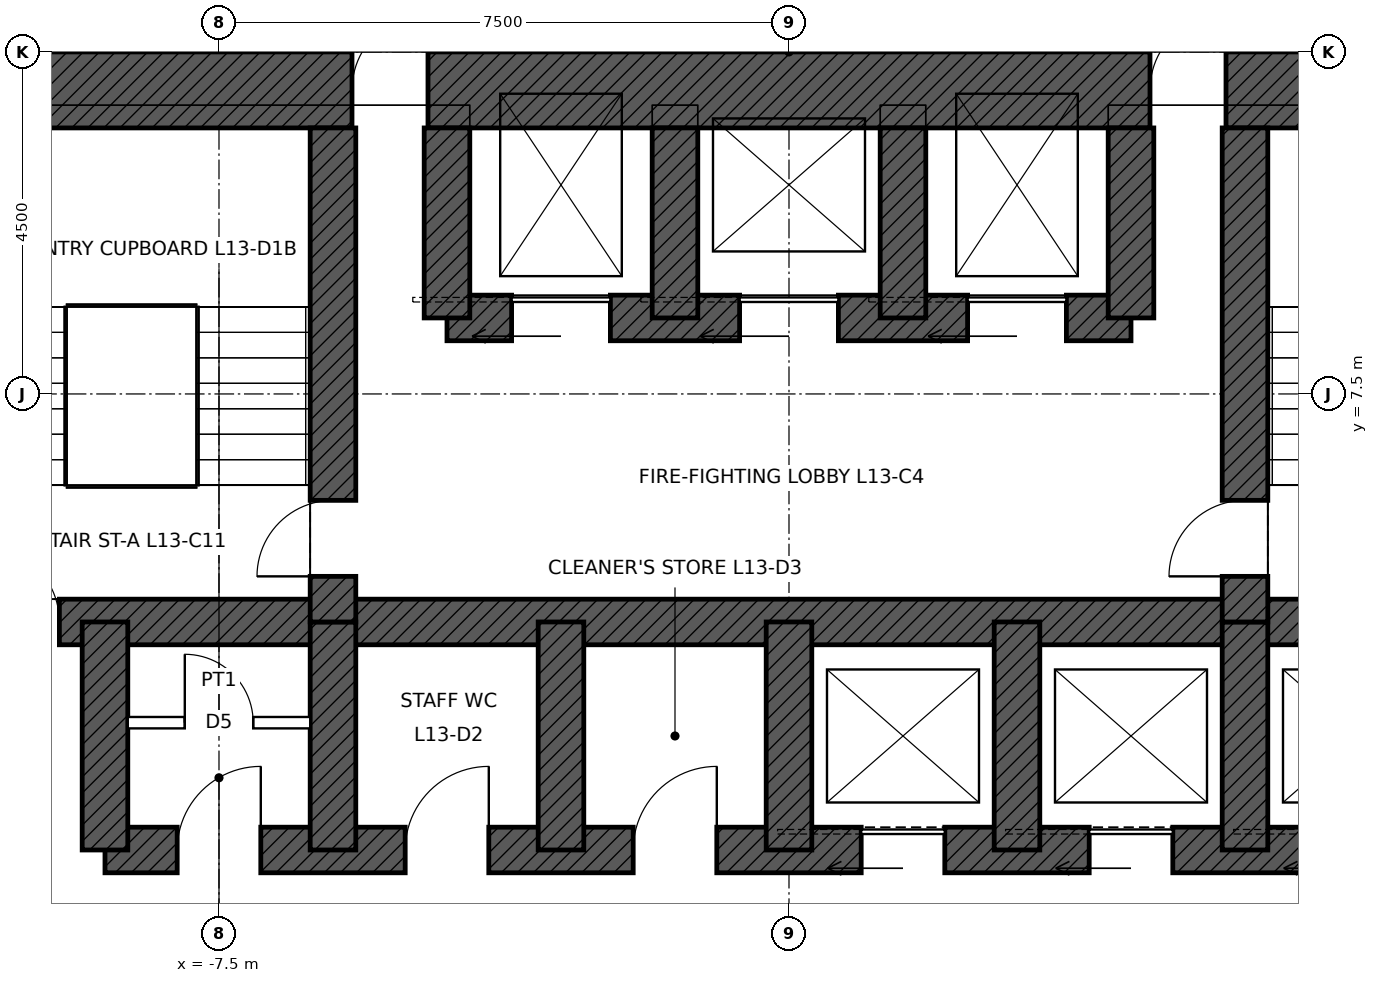
"""IFC4 building model, lengths in metres.
Left out: names, types, materials, properties, quantities, classifications, styles, units other than length and angle.
Written with IfcOpenShell. Run it as: python <this file> out.ifc"""

import sys

from ifc_helpers import new_model, si_unit, direction, frame, frame_2d, origin, place, context, subcontext, project, spatial, rectangle, extrude, element, fill, save


model = new_model("IFC4")
c1 = context("Model", 3, precision=1e-05, world=origin(), true_north=direction((0.0, 1.0)))
c2 = subcontext(c1, "Body", "Model", "MODEL_VIEW")
j1 = project(units=[si_unit("LENGTHUNIT", "METRE"), si_unit("PLANEANGLEUNIT", "RADIAN")], contexts=[c1])
p1 = place(None, origin())
s1 = spatial("IfcSite", under=j1, at=p1, CompositionType="ELEMENT")
p2 = place(p1, origin())
s2 = spatial("IfcBuilding", under=s1, at=p2, CompositionType="ELEMENT")
p3 = place(p2, frame((0.0, 0.0, 68.4)))
s3 = spatial("IfcBuildingStorey", under=s2, at=p3, CompositionType="ELEMENT", Elevation=68.4)
p4 = place(p3, frame((-12.0, 11.5, 0.0), z_axis=(0.0, 0.0, 1.0), x_axis=(1.0, 0.0, 0.0)))
e1 = element("IfcWall", 1, at=p4, inside=s3, PredefinedType="SHEAR", context=c2, shape_type="SweptSolid", body=[
    extrude(rectangle(XDim=24.0, YDim=1.0, at=frame_2d((12.0, 0.0))), origin(), (0.0, 0.0, 1.0), 5.0),
])
p5 = place(p4, frame((6.25, 0.0, 0.0)))
e2 = element("IfcOpeningElement", 2, at=p5, cuts=e1, PredefinedType="OPENING", context=c2, shape_type="SweptSolid", body=[
    extrude(rectangle(XDim=1.0, YDim=2.4, at=frame_2d((0.5, 1.2))), frame((0.0, 0.51, 0.0), z_axis=(0.0, -1.0, 0.0), x_axis=(1.0, 0.0, 0.0)), (0.0, 0.0, 1.0), 1.02),
])
p6 = place(p4, frame((16.75, 0.0, 0.0)))
e3 = element("IfcOpeningElement", 3, at=p6, cuts=e1, PredefinedType="OPENING", context=c2, shape_type="SweptSolid", body=[
    extrude(rectangle(XDim=1.0, YDim=2.4, at=frame_2d((0.5, 1.2))), frame((0.0, 0.51, 0.0), z_axis=(0.0, -1.0, 0.0), x_axis=(1.0, 0.0, 0.0)), (0.0, 0.0, 1.0), 1.02),
])
p7 = place(p3, frame((-11.0, 4.5, 0.0), z_axis=(0.0, 0.0, 1.0), x_axis=(1.0, 0.0, 0.0)))
e4 = element("IfcWall", 4, at=p7, inside=s3, PredefinedType="SHEAR", context=c2, shape_type="SweptSolid", body=[
    extrude(rectangle(XDim=22.0, YDim=0.6, at=frame_2d((11.0, 0.0))), origin(), (0.0, 0.0, 1.0), 5.0),
])
p8 = place(p7, frame((0.4, 0.0, 0.0)))
e5 = element("IfcOpeningElement", 5, at=p8, cuts=e4, PredefinedType="OPENING", context=c2, shape_type="SweptSolid", body=[
    extrude(rectangle(XDim=1.0, YDim=2.1, at=frame_2d((0.5, 1.05))), frame((0.0, 0.31, 0.0), z_axis=(0.0, -1.0, 0.0), x_axis=(1.0, 0.0, 0.0)), (0.0, 0.0, 1.0), 0.62),
])
p9 = place(p7, frame((20.6, 0.0, 0.0)))
e6 = element("IfcOpeningElement", 6, at=p9, cuts=e4, PredefinedType="OPENING", context=c2, shape_type="SweptSolid", body=[
    extrude(rectangle(XDim=1.0, YDim=2.1, at=frame_2d((0.5, 1.05))), frame((0.0, 0.31, 0.0), z_axis=(0.0, -1.0, 0.0), x_axis=(1.0, 0.0, 0.0)), (0.0, 0.0, 1.0), 0.62),
])
p10 = place(p3, frame((-9.0, 1.5, 0.0), z_axis=(0.0, 0.0, 1.0), x_axis=(1.0, 0.0, 0.0)))
e7 = element("IfcWall", 7, at=p10, inside=s3, PredefinedType="SHEAR", context=c2, shape_type="SweptSolid", body=[
    extrude(rectangle(XDim=18.0, YDim=0.6, at=frame_2d((9.0, 0.0))), origin(), (0.0, 0.0, 1.0), 5.0),
])
p11 = place(p10, frame((9.95, 0.0, 0.0)))
e8 = element("IfcOpeningElement", 8, at=p11, cuts=e7, PredefinedType="OPENING", context=c2, shape_type="SweptSolid", body=[
    extrude(rectangle(XDim=1.1, YDim=2.1, at=frame_2d((0.55, 1.05))), frame((0.0, 0.31, 0.0), z_axis=(0.0, -1.0, 0.0), x_axis=(1.0, 0.0, 0.0)), (0.0, 0.0, 1.0), 0.62),
])
p12 = place(p10, frame((12.95, 0.0, 0.0)))
e9 = element("IfcOpeningElement", 9, at=p12, cuts=e7, PredefinedType="OPENING", context=c2, shape_type="SweptSolid", body=[
    extrude(rectangle(XDim=1.1, YDim=2.1, at=frame_2d((0.55, 1.05))), frame((0.0, 0.31, 0.0), z_axis=(0.0, -1.0, 0.0), x_axis=(1.0, 0.0, 0.0)), (0.0, 0.0, 1.0), 0.62),
])
p13 = place(p10, frame((15.95, 0.0, 0.0)))
e10 = element("IfcOpeningElement", 10, at=p13, cuts=e7, PredefinedType="OPENING", context=c2, shape_type="SweptSolid", body=[
    extrude(rectangle(XDim=1.1, YDim=2.1, at=frame_2d((0.55, 1.05))), frame((0.0, 0.31, 0.0), z_axis=(0.0, -1.0, 0.0), x_axis=(1.0, 0.0, 0.0)), (0.0, 0.0, 1.0), 0.62),
])
p14 = place(p10, frame((0.95, 0.0, 0.0)))
e11 = element("IfcOpeningElement", 11, at=p14, cuts=e7, PredefinedType="OPENING", context=c2, shape_type="SweptSolid", body=[
    extrude(rectangle(XDim=1.1, YDim=2.1, at=frame_2d((0.55, 1.05))), frame((0.0, 0.31, 0.0), z_axis=(0.0, -1.0, 0.0), x_axis=(1.0, 0.0, 0.0)), (0.0, 0.0, 1.0), 0.62),
])
p15 = place(p10, frame((3.95, 0.0, 0.0)))
e12 = element("IfcOpeningElement", 12, at=p15, cuts=e7, PredefinedType="OPENING", context=c2, shape_type="SweptSolid", body=[
    extrude(rectangle(XDim=1.1, YDim=2.1, at=frame_2d((0.55, 1.05))), frame((0.0, 0.31, 0.0), z_axis=(0.0, -1.0, 0.0), x_axis=(1.0, 0.0, 0.0)), (0.0, 0.0, 1.0), 0.62),
])
p16 = place(p10, frame((6.95, 0.0, 0.0)))
e13 = element("IfcOpeningElement", 13, at=p16, cuts=e7, PredefinedType="OPENING", context=c2, shape_type="SweptSolid", body=[
    extrude(rectangle(XDim=1.1, YDim=2.1, at=frame_2d((0.55, 1.05))), frame((0.0, 0.31, 0.0), z_axis=(0.0, -1.0, 0.0), x_axis=(1.0, 0.0, 0.0)), (0.0, 0.0, 1.0), 0.62),
])
p17 = place(p3, frame((-4.5, 8.5, 0.0), z_axis=(0.0, 0.0, 1.0), x_axis=(1.0, 0.0, 0.0)))
e14 = element("IfcWall", 14, at=p17, inside=s3, PredefinedType="SHEAR", context=c2, shape_type="SweptSolid", body=[
    extrude(rectangle(XDim=9.0, YDim=0.6, at=frame_2d((4.5, 0.0))), origin(), (0.0, 0.0, 1.0), 5.0),
])
p18 = place(p17, frame((0.85, 0.0, 0.0)))
e15 = element("IfcOpeningElement", 15, at=p18, cuts=e14, PredefinedType="OPENING", context=c2, shape_type="SweptSolid", body=[
    extrude(rectangle(XDim=1.3, YDim=2.4, at=frame_2d((0.65, 1.2))), frame((0.0, 0.31, 0.0), z_axis=(0.0, -1.0, 0.0), x_axis=(1.0, 0.0, 0.0)), (0.0, 0.0, 1.0), 0.62),
])
p19 = place(p17, frame((6.85, 0.0, 0.0)))
e16 = element("IfcOpeningElement", 16, at=p19, cuts=e14, PredefinedType="OPENING", context=c2, shape_type="SweptSolid", body=[
    extrude(rectangle(XDim=1.3, YDim=2.4, at=frame_2d((0.65, 1.2))), frame((0.0, 0.31, 0.0), z_axis=(0.0, -1.0, 0.0), x_axis=(1.0, 0.0, 0.0)), (0.0, 0.0, 1.0), 0.62),
])
p20 = place(p17, frame((3.85, 0.0, 0.0)))
e17 = element("IfcOpeningElement", 17, at=p20, cuts=e14, PredefinedType="OPENING", context=c2, shape_type="SweptSolid", body=[
    extrude(rectangle(XDim=1.3, YDim=2.4, at=frame_2d((0.65, 1.2))), frame((0.0, 0.31, 0.0), z_axis=(0.0, -1.0, 0.0), x_axis=(1.0, 0.0, 0.0)), (0.0, 0.0, 1.0), 0.62),
])
for number, where, z_axis, x_axis in (
    (18, (-9.0, 1.5, 0.0), (0.0, 0.0, 1.0), (0.0, 1.0, 0.0)),
    (19, (-6.0, 1.5, 0.0), (0.0, 0.0, 1.0), (0.0, 1.0, 0.0)),
    (20, (-3.0, 1.5, 0.0), (0.0, 0.0, 1.0), (0.0, 1.0, 0.0)),
    (21, (0.0, 1.5, 0.0), (0.0, 0.0, 1.0), (0.0, 1.0, 0.0)),
    (22, (3.0, 1.5, 0.0), (0.0, 0.0, 1.0), (0.0, 1.0, 0.0)),
    (23, (6.0, 1.5, 0.0), (0.0, 0.0, 1.0), (0.0, 1.0, 0.0)),
):
    element("IfcWall", number, at=place(p3, frame(where, z_axis=z_axis, x_axis=x_axis)), inside=s3, PredefinedType="SHEAR", context=c2, shape_type="SweptSolid", body=[
        extrude(rectangle(XDim=3.0, YDim=0.6, at=frame_2d((1.5, 0.0))), origin(), (0.0, 0.0, 1.0), 5.0),
    ])
p21 = place(p3, frame((-6.0, 4.5, 0.0), z_axis=(0.0, 0.0, 1.0), x_axis=(0.0, 1.0, 0.0)))
e24 = element("IfcWall", 24, at=p21, inside=s3, PredefinedType="SHEAR", context=c2, shape_type="SweptSolid", body=[
    extrude(rectangle(XDim=6.5, YDim=0.6, at=frame_2d((3.25, 0.0))), origin(), (0.0, 0.0, 1.0), 5.0),
])
p22 = place(p21, frame((0.6, 0.0, 0.0)))
e25 = element("IfcOpeningElement", 25, at=p22, cuts=e24, PredefinedType="OPENING", context=c2, shape_type="SweptSolid", body=[
    extrude(rectangle(XDim=1.0, YDim=2.1, at=frame_2d((0.5, 1.05))), frame((0.0, 0.31, 0.0), z_axis=(0.0, -1.0, 0.0), x_axis=(1.0, 0.0, 0.0)), (0.0, 0.0, 1.0), 0.62),
])
p23 = place(p3, frame((6.0, 4.5, 0.0), z_axis=(0.0, 0.0, 1.0), x_axis=(0.0, 1.0, 0.0)))
e26 = element("IfcWall", 26, at=p23, inside=s3, PredefinedType="SHEAR", context=c2, shape_type="SweptSolid", body=[
    extrude(rectangle(XDim=6.5, YDim=0.6, at=frame_2d((3.25, 0.0))), origin(), (0.0, 0.0, 1.0), 5.0),
])
p24 = place(p23, frame((0.6, 0.0, 0.0)))
e27 = element("IfcOpeningElement", 27, at=p24, cuts=e26, PredefinedType="OPENING", context=c2, shape_type="SweptSolid", body=[
    extrude(rectangle(XDim=1.0, YDim=2.1, at=frame_2d((0.5, 1.05))), frame((0.0, 0.31, 0.0), z_axis=(0.0, -1.0, 0.0), x_axis=(1.0, 0.0, 0.0)), (0.0, 0.0, 1.0), 0.62),
])
for number, where, z_axis, x_axis in (
    (28, (-4.5, 8.5, 0.0), (0.0, 0.0, 1.0), (0.0, 1.0, 0.0)),
    (29, (4.5, 8.5, 0.0), (0.0, 0.0, 1.0), (0.0, 1.0, 0.0)),
    (30, (-1.5, 8.5, 0.0), (0.0, 0.0, 1.0), (0.0, 1.0, 0.0)),
    (31, (1.5, 8.5, 0.0), (0.0, 0.0, 1.0), (0.0, 1.0, 0.0)),
):
    element("IfcWall", number, at=place(p3, frame(where, z_axis=z_axis, x_axis=x_axis)), inside=s3, PredefinedType="SHEAR", context=c2, shape_type="SweptSolid", body=[
        extrude(rectangle(XDim=2.5, YDim=0.6, at=frame_2d((1.25, 0.0))), origin(), (0.0, 0.0, 1.0), 5.0),
    ])
p25 = place(p3, frame((-8.7, 3.175, 0.0), z_axis=(0.0, 0.0, 1.0), x_axis=(1.0, 0.0, 0.0)))
e32 = element("IfcWall", 32, at=p25, inside=s3, PredefinedType="PARTITIONING", context=c2, shape_type="SweptSolid", body=[
    extrude(rectangle(XDim=2.4, YDim=0.15, at=frame_2d((1.2, 0.0))), origin(), (0.0, 0.0, 1.0), 4.75),
])
p26 = place(p25, frame((0.75, 0.0, 0.0)))
e33 = element("IfcOpeningElement", 33, at=p26, cuts=e32, PredefinedType="OPENING", context=c2, shape_type="SweptSolid", body=[
    extrude(rectangle(XDim=0.9, YDim=2.1, at=frame_2d((0.45, 1.05))), frame((0.0, 0.085, 0.0), z_axis=(0.0, -1.0, 0.0), x_axis=(1.0, 0.0, 0.0)), (0.0, 0.0, 1.0), 0.17),
])
p27 = place(p8, origin())
e34 = element("IfcDoor", 34, at=p27, inside=s3, OperationType="SINGLE_SWING_LEFT", PredefinedType="DOOR", context=c2, shape_type="SweptSolid", body=[
    extrude(rectangle(XDim=1.0, YDim=2.1, at=frame_2d((0.5, 1.05))), frame((0.0, 0.025, 0.0), z_axis=(0.0, -1.0, 0.0), x_axis=(1.0, 0.0, 0.0)), (0.0, 0.0, 1.0), 0.05),
])
fill(e5, e34)
p28 = place(p22, origin())
e35 = element("IfcDoor", 35, at=p28, inside=s3, OperationType="SINGLE_SWING_LEFT", PredefinedType="DOOR", context=c2, shape_type="SweptSolid", body=[
    extrude(rectangle(XDim=1.0, YDim=2.1, at=frame_2d((0.5, 1.05))), frame((0.0, 0.025, 0.0), z_axis=(0.0, -1.0, 0.0), x_axis=(1.0, 0.0, 0.0)), (0.0, 0.0, 1.0), 0.05),
])
fill(e25, e35)
p29 = place(p24, origin())
e36 = element("IfcDoor", 36, at=p29, inside=s3, OperationType="SINGLE_SWING_LEFT", PredefinedType="DOOR", context=c2, shape_type="SweptSolid", body=[
    extrude(rectangle(XDim=1.0, YDim=2.1, at=frame_2d((0.5, 1.05))), frame((0.0, 0.025, 0.0), z_axis=(0.0, -1.0, 0.0), x_axis=(1.0, 0.0, 0.0)), (0.0, 0.0, 1.0), 0.05),
])
fill(e27, e36)
p30 = place(p5, origin())
e37 = element("IfcDoor", 37, at=p30, inside=s3, OperationType="SINGLE_SWING_RIGHT", PredefinedType="DOOR", context=c2, shape_type="SweptSolid", body=[
    extrude(rectangle(XDim=1.0, YDim=2.4, at=frame_2d((0.5, 1.2))), frame((0.0, 0.485, 0.0), z_axis=(0.0, -1.0, 0.0), x_axis=(1.0, 0.0, 0.0)), (0.0, 0.0, 1.0), 0.05),
])
fill(e2, e37)
p31 = place(p6, origin())
e38 = element("IfcDoor", 38, at=p31, inside=s3, OperationType="SINGLE_SWING_RIGHT", PredefinedType="DOOR", context=c2, shape_type="SweptSolid", body=[
    extrude(rectangle(XDim=1.0, YDim=2.4, at=frame_2d((0.5, 1.2))), frame((0.0, 0.485, 0.0), z_axis=(0.0, -1.0, 0.0), x_axis=(1.0, 0.0, 0.0)), (0.0, 0.0, 1.0), 0.05),
])
fill(e3, e38)
p32 = place(p18, origin())
e39 = element("IfcDoor", 39, at=p32, inside=s3, OperationType="SLIDING_TO_LEFT", PredefinedType="DOOR", context=c2, shape_type="SweptSolid", body=[
    extrude(rectangle(XDim=1.3, YDim=2.4, at=frame_2d((0.65, 1.2))), frame((0.0, 0.025, 0.0), z_axis=(0.0, -1.0, 0.0), x_axis=(1.0, 0.0, 0.0)), (0.0, 0.0, 1.0), 0.05),
])
fill(e15, e39)
p33 = place(p19, origin())
e40 = element("IfcDoor", 40, at=p33, inside=s3, OperationType="SLIDING_TO_LEFT", PredefinedType="DOOR", context=c2, shape_type="SweptSolid", body=[
    extrude(rectangle(XDim=1.3, YDim=2.4, at=frame_2d((0.65, 1.2))), frame((0.0, 0.025, 0.0), z_axis=(0.0, -1.0, 0.0), x_axis=(1.0, 0.0, 0.0)), (0.0, 0.0, 1.0), 0.05),
])
fill(e16, e40)
p34 = place(p20, origin())
e41 = element("IfcDoor", 41, at=p34, inside=s3, OperationType="SLIDING_TO_LEFT", PredefinedType="DOOR", context=c2, shape_type="SweptSolid", body=[
    extrude(rectangle(XDim=1.3, YDim=2.4, at=frame_2d((0.65, 1.2))), frame((0.0, 0.025, 0.0), z_axis=(0.0, -1.0, 0.0), x_axis=(1.0, 0.0, 0.0)), (0.0, 0.0, 1.0), 0.05),
])
fill(e17, e41)
p35 = place(p11, origin())
e42 = element("IfcDoor", 42, at=p35, inside=s3, OperationType="SLIDING_TO_LEFT", PredefinedType="DOOR", context=c2, shape_type="SweptSolid", body=[
    extrude(rectangle(XDim=1.1, YDim=2.1, at=frame_2d((0.55, 1.05))), frame((0.0, 0.025, 0.0), z_axis=(0.0, -1.0, 0.0), x_axis=(1.0, 0.0, 0.0)), (0.0, 0.0, 1.0), 0.05),
])
fill(e8, e42)
p36 = place(p12, origin())
e43 = element("IfcDoor", 43, at=p36, inside=s3, OperationType="SLIDING_TO_LEFT", PredefinedType="DOOR", context=c2, shape_type="SweptSolid", body=[
    extrude(rectangle(XDim=1.1, YDim=2.1, at=frame_2d((0.55, 1.05))), frame((0.0, 0.025, 0.0), z_axis=(0.0, -1.0, 0.0), x_axis=(1.0, 0.0, 0.0)), (0.0, 0.0, 1.0), 0.05),
])
fill(e9, e43)
p37 = place(p14, origin())
e44 = element("IfcDoor", 44, at=p37, inside=s3, OperationType="SINGLE_SWING_RIGHT", PredefinedType="DOOR", context=c2, shape_type="SweptSolid", body=[
    extrude(rectangle(XDim=1.1, YDim=2.1, at=frame_2d((0.55, 1.05))), frame((0.0, 0.025, 0.0), z_axis=(0.0, -1.0, 0.0), x_axis=(1.0, 0.0, 0.0)), (0.0, 0.0, 1.0), 0.05),
])
fill(e11, e44)
p38 = place(p26, origin())
e45 = element("IfcDoor", 45, at=p38, inside=s3, OperationType="SINGLE_SWING_LEFT", PredefinedType="DOOR", context=c2, shape_type="SweptSolid", body=[
    extrude(rectangle(XDim=0.9, YDim=2.1, at=frame_2d((0.45, 1.05))), frame((0.0, 0.025, 0.0), z_axis=(0.0, -1.0, 0.0), x_axis=(1.0, 0.0, 0.0)), (0.0, 0.0, 1.0), 0.05),
])
fill(e33, e45)
p39 = place(p15, origin())
e46 = element("IfcDoor", 46, at=p39, inside=s3, OperationType="SINGLE_SWING_RIGHT", PredefinedType="DOOR", context=c2, shape_type="SweptSolid", body=[
    extrude(rectangle(XDim=1.1, YDim=2.1, at=frame_2d((0.55, 1.05))), frame((0.0, 0.025, 0.0), z_axis=(0.0, -1.0, 0.0), x_axis=(1.0, 0.0, 0.0)), (0.0, 0.0, 1.0), 0.05),
])
fill(e12, e46)
p40 = place(p16, origin())
e47 = element("IfcDoor", 47, at=p40, inside=s3, OperationType="SINGLE_SWING_RIGHT", PredefinedType="DOOR", context=c2, shape_type="SweptSolid", body=[
    extrude(rectangle(XDim=1.1, YDim=2.1, at=frame_2d((0.55, 1.05))), frame((0.0, 0.025, 0.0), z_axis=(0.0, -1.0, 0.0), x_axis=(1.0, 0.0, 0.0)), (0.0, 0.0, 1.0), 0.05),
])
fill(e13, e47)
save(model, sys.argv[1])
